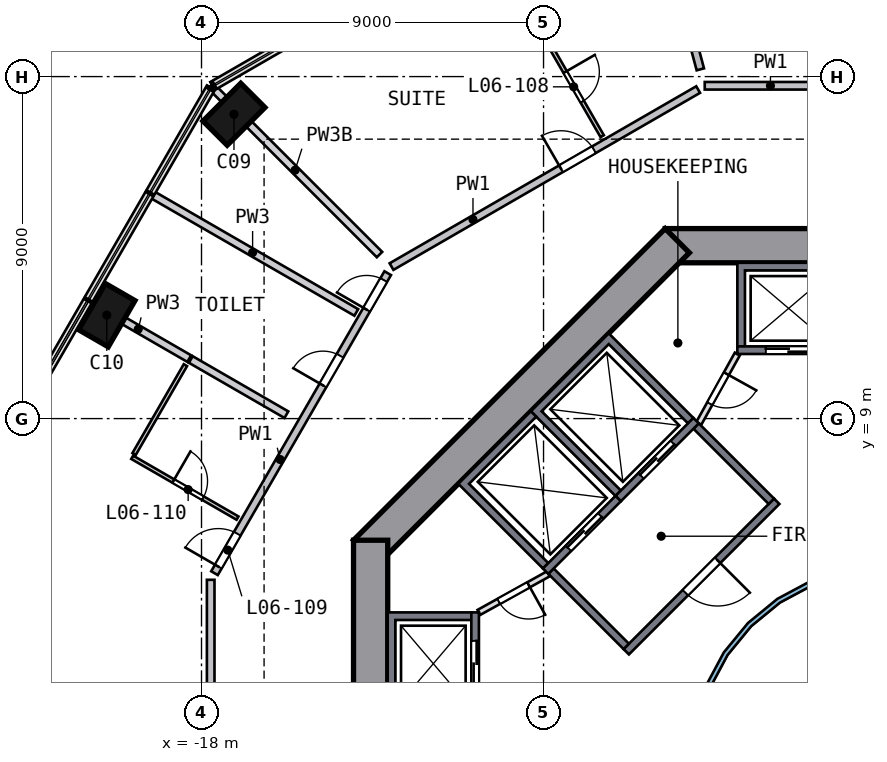
"""IFC4 building model, lengths in metres.
Left out: names, types, materials, properties, quantities, classifications, styles, units other than length and angle.
Written with IfcOpenShell. Run it as: python <this file> out.ifc"""

import sys

from ifc_helpers import new_model, si_unit, direction, frame, frame_2d, origin, origin_2d, place, context, subcontext, project, spatial, polyline, rectangle, outline, extrude, element, fill, save


model = new_model("IFC4")
c1 = context("Model", 3, precision=1e-05, world=origin(), true_north=direction((0.0, 1.0)))
c2 = subcontext(c1, "Body", "Model", "MODEL_VIEW")
j1 = project(units=[si_unit("LENGTHUNIT", "METRE"), si_unit("PLANEANGLEUNIT", "RADIAN")], contexts=[c1])
p1 = place(None, origin())
s1 = spatial("IfcSite", under=j1, at=p1, CompositionType="ELEMENT")
p2 = place(p1, origin())
s2 = spatial("IfcBuilding", under=s1, at=p2, CompositionType="ELEMENT")
p3 = place(p2, frame((0.0, 0.0, 34.0)))
s3 = spatial("IfcBuildingStorey", under=s2, at=p3, CompositionType="ELEMENT", Elevation=34.0)
p4 = place(p3, frame((-17.077, 17.077, 0.0), z_axis=(-0.056608184, -0.057490254, 0.996739878), x_axis=(0.705296544, 0.704306489, 0.08067934)))
e1 = element("IfcColumn", 1, at=p4, inside=s3, PredefinedType="COLUMN", context=c2, shape_type="SweptSolid", body=[
    extrude(rectangle(XDim=1.4, YDim=0.9, at=origin_2d()), origin(), (0.0, 0.0, 1.0), 4.705),
])
p5 = place(p3, frame((-20.445, 11.804, 0.0), z_axis=(-0.038868575, -0.068655708, 0.996882956), x_axis=(-0.498424045, -0.863336283, -0.078891906)))
e2 = element("IfcColumn", 2, at=p5, inside=s3, PredefinedType="COLUMN", context=c2, shape_type="SweptSolid", body=[
    extrude(rectangle(XDim=1.4, YDim=0.9, at=origin_2d()), origin(), (0.0, 0.0, 1.0), 4.705),
])
p6 = place(p3, frame((5.799, 13.55, 0.0), z_axis=(0.0, 0.0, 1.0), x_axis=(-1.0, 0.0, 0.0)))
e3 = element("IfcWall", 3, at=p6, inside=s3, PredefinedType="SHEAR", context=c2, shape_type="SweptSolid", body=[
    extrude(rectangle(XDim=11.598, YDim=0.9, at=frame_2d((5.799, 0.0))), origin(), (0.0, 0.0, 1.0), 5.0),
])
p7 = place(p6, frame((4.899, 0.0, 0.0)))
e4 = element("IfcOpeningElement", 4, at=p7, cuts=e3, PredefinedType="OPENING", context=c2, shape_type="SweptSolid", body=[
    extrude(rectangle(XDim=1.8, YDim=2.1, at=frame_2d((0.9, 1.05))), frame((0.0, 0.46, 0.0), z_axis=(0.0, -1.0, 0.0), x_axis=(1.0, 0.0, 0.0)), (0.0, 0.0, 1.0), 0.92),
])
p8 = place(p3, frame((-5.481, 13.682, 0.0), z_axis=(0.0, 0.0, 1.0), x_axis=(-0.707106781, -0.707106781, 0.0)))
e5 = element("IfcWall", 5, at=p8, inside=s3, PredefinedType="SHEAR", context=c2, shape_type="SweptSolid", body=[
    extrude(rectangle(XDim=11.598, YDim=0.9, at=frame_2d((5.799, 0.0))), origin(), (0.0, 0.0, 1.0), 5.0),
])
p9 = place(p3, frame((-13.55, 5.799, 0.0), z_axis=(0.0, 0.0, 1.0), x_axis=(0.0, -1.0, 0.0)))
e6 = element("IfcWall", 6, at=p9, inside=s3, PredefinedType="SHEAR", context=c2, shape_type="SweptSolid", body=[
    extrude(rectangle(XDim=11.598, YDim=0.9, at=frame_2d((5.799, 0.0))), origin(), (0.0, 0.0, 1.0), 5.0),
])
p10 = place(p9, frame((4.899, 0.0, 0.0)))
e7 = element("IfcOpeningElement", 7, at=p10, cuts=e6, PredefinedType="OPENING", context=c2, shape_type="SweptSolid", body=[
    extrude(rectangle(XDim=1.8, YDim=2.1, at=frame_2d((0.9, 1.05))), frame((0.0, 0.46, 0.0), z_axis=(0.0, -1.0, 0.0), x_axis=(1.0, 0.0, 0.0)), (0.0, 0.0, 1.0), 0.92),
])
p11 = place(p3, origin())
e8 = element("IfcWall", 8, at=p11, inside=s3, PredefinedType="SOLIDWALL", context=c2, shape_type="SweptSolid", body=[
    extrude(outline(polyline([(-3.9, 10.9), (-3.9, 13.1), (-1.2, 13.1), (-1.2, 10.9), (-1.4, 10.9), (-1.4, 12.9), (-3.7, 12.9), (-3.7, 10.9), (-3.9, 10.9)])), origin(), (0.0, 0.0, 1.0), 4.69),
])
p12 = place(p3, frame((-1.2, 10.8, 0.0), z_axis=(0.0, 0.0, 1.0), x_axis=(-1.0, 0.0, 0.0)))
e9 = element("IfcWall", 9, at=p12, inside=s3, PredefinedType="SOLIDWALL", context=c2, shape_type="SweptSolid", body=[
    extrude(rectangle(XDim=2.7, YDim=0.2, at=frame_2d((1.35, 0.0))), origin(), (0.0, 0.0, 1.0), 4.69),
])
p13 = place(p12, frame((0.75, 0.0, 0.0)))
e10 = element("IfcOpeningElement", 10, at=p13, cuts=e9, PredefinedType="OPENING", context=c2, shape_type="SweptSolid", body=[
    extrude(rectangle(XDim=1.2, YDim=2.1, at=frame_2d((0.6, 1.05))), frame((0.0, 0.11, 0.0), z_axis=(0.0, -1.0, 0.0), x_axis=(1.0, 0.0, 0.0)), (0.0, 0.0, 1.0), 0.22),
])
p14 = place(p3, origin())
e11 = element("IfcWall", 11, at=p14, inside=s3, PredefinedType="SOLIDWALL", context=c2, shape_type="SweptSolid", body=[
    extrude(outline(polyline([(-13.1, 3.9), (-10.9, 3.9), (-10.9, 3.7), (-12.9, 3.7), (-12.9, 1.4), (-10.9, 1.4), (-10.9, 1.2), (-13.1, 1.2), (-13.1, 3.9)])), origin(), (0.0, 0.0, 1.0), 4.69),
])
p15 = place(p3, frame((-10.8, 1.2, 0.0), z_axis=(0.0, 0.0, 1.0), x_axis=(0.0, 1.0, 0.0)))
e12 = element("IfcWall", 12, at=p15, inside=s3, PredefinedType="SOLIDWALL", context=c2, shape_type="SweptSolid", body=[
    extrude(rectangle(XDim=2.7, YDim=0.2, at=frame_2d((1.35, 0.0))), origin(), (0.0, 0.0, 1.0), 4.69),
])
p16 = place(p15, frame((0.75, 0.0, 0.0)))
e13 = element("IfcOpeningElement", 13, at=p16, cuts=e12, PredefinedType="OPENING", context=c2, shape_type="SweptSolid", body=[
    extrude(rectangle(XDim=1.2, YDim=2.1, at=frame_2d((0.6, 1.05))), frame((0.0, 0.11, 0.0), z_axis=(0.0, -1.0, 0.0), x_axis=(1.0, 0.0, 0.0)), (0.0, 0.0, 1.0), 0.22),
])
p17 = place(p3, origin())
e14 = element("IfcWall", 14, at=p17, inside=s3, PredefinedType="SOLIDWALL", context=c2, shape_type="SweptSolid", body=[
    extrude(outline(polyline([(-9.334, 9.192), (-7.283, 11.243), (-5.056, 9.016), (-5.197, 8.874), (-7.283, 10.96), (-9.051, 9.192), (-6.965, 7.106), (-7.106, 6.965), (-9.334, 9.192)])), origin(), (0.0, 0.0, 1.0), 4.69),
])
p18 = place(p3, frame((-4.985, 8.945, 0.0), z_axis=(0.0, 0.0, 1.0), x_axis=(-0.707106781, -0.707106781, 0.0)))
e15 = element("IfcWall", 15, at=p18, inside=s3, PredefinedType="SOLIDWALL", context=c2, shape_type="SweptSolid", body=[
    extrude(rectangle(XDim=2.9, YDim=0.2, at=frame_2d((1.45, 0.0))), origin(), (0.0, 0.0, 1.0), 4.69),
])
p19 = place(p18, frame((0.85, 0.0, 0.0)))
e16 = element("IfcOpeningElement", 16, at=p19, cuts=e15, PredefinedType="OPENING", context=c2, shape_type="SweptSolid", body=[
    extrude(rectangle(XDim=1.2, YDim=2.1, at=frame_2d((0.6, 1.05))), frame((0.0, 0.11, 0.0), z_axis=(0.0, -1.0, 0.0), x_axis=(1.0, 0.0, 0.0)), (0.0, 0.0, 1.0), 0.22),
])
p20 = place(p3, origin())
e17 = element("IfcWall", 17, at=p20, inside=s3, PredefinedType="SOLIDWALL", context=c2, shape_type="SweptSolid", body=[
    extrude(outline(polyline([(-11.243, 7.283), (-9.334, 9.192), (-9.192, 9.051), (-10.96, 7.283), (-8.874, 5.197), (-9.016, 5.056), (-11.243, 7.283)])), origin(), (0.0, 0.0, 1.0), 4.69),
])
p21 = place(p3, frame((-7.036, 6.894, 0.0), z_axis=(0.0, 0.0, 1.0), x_axis=(-0.707106781, -0.707106781, 0.0)))
e18 = element("IfcWall", 18, at=p21, inside=s3, PredefinedType="SOLIDWALL", context=c2, shape_type="SweptSolid", body=[
    extrude(rectangle(XDim=2.7, YDim=0.2, at=frame_2d((1.35, 0.0))), origin(), (0.0, 0.0, 1.0), 4.69),
])
p22 = place(p21, frame((0.65, 0.0, 0.0)))
e19 = element("IfcOpeningElement", 19, at=p22, cuts=e18, PredefinedType="OPENING", context=c2, shape_type="SweptSolid", body=[
    extrude(rectangle(XDim=1.2, YDim=2.1, at=frame_2d((0.6, 1.05))), frame((0.0, 0.11, 0.0), z_axis=(0.0, -1.0, 0.0), x_axis=(1.0, 0.0, 0.0)), (0.0, 0.0, 1.0), 0.22),
])
p23 = place(p3, frame((-2.864, 6.823, 0.0), z_axis=(0.0, 0.0, 1.0), x_axis=(-0.707106781, -0.707106781, 0.0)))
e20 = element("IfcWall", 20, at=p23, inside=s3, PredefinedType="SOLIDWALL", context=c2, shape_type="SweptSolid", body=[
    extrude(rectangle(XDim=5.6, YDim=0.2, at=frame_2d((2.8, 0.0))), origin(), (0.0, 0.0, 1.0), 4.69),
])
p24 = place(p23, frame((2.2, 0.0, 0.0)))
e21 = element("IfcOpeningElement", 21, at=p24, cuts=e20, PredefinedType="OPENING", context=c2, shape_type="SweptSolid", body=[
    extrude(rectangle(XDim=1.2, YDim=2.1, at=frame_2d((0.6, 1.05))), frame((0.0, 0.11, 0.0), z_axis=(0.0, -1.0, 0.0), x_axis=(1.0, 0.0, 0.0)), (0.0, 0.0, 1.0), 0.22),
])
for number, where, z_axis, x_axis in (
    (22, (-3.005, 6.823, 0.0), (0.0, 0.0, 1.0), (-0.707, 0.707, 0.0)),
    (23, (-6.823, 3.005, 0.0), (0.0, 0.0, 1.0), (-0.707, 0.707, 0.0)),
):
    element("IfcWall", number, at=place(p3, frame(where, z_axis=z_axis, x_axis=x_axis)), inside=s3, PredefinedType="SOLIDWALL", context=c2, shape_type="SweptSolid", body=[
        extrude(rectangle(XDim=2.8, YDim=0.2, at=frame_2d((1.4, 0.0))), origin(), (0.0, 0.0, 1.0), 4.69),
    ])
p25 = place(p3, frame((-3.9, 10.7, 0.0), z_axis=(0.0, 0.0, 1.0), x_axis=(-0.485692555, -0.874129705, 0.0)))
e24 = element("IfcWall", 24, at=p25, inside=s3, PredefinedType="PARTITIONING", context=c2, shape_type="SweptSolid", body=[
    extrude(rectangle(XDim=2.089, YDim=0.15, at=frame_2d((1.044, 0.0))), origin(), (0.0, 0.0, 1.0), 4.69),
])
p26 = place(p25, frame((0.594, 0.0, 0.0)))
e25 = element("IfcOpeningElement", 25, at=p26, cuts=e24, PredefinedType="OPENING", context=c2, shape_type="SweptSolid", body=[
    extrude(rectangle(XDim=0.9, YDim=2.1, at=frame_2d((0.45, 1.05))), frame((0.0, 0.085, 0.0), z_axis=(0.0, -1.0, 0.0), x_axis=(1.0, 0.0, 0.0)), (0.0, 0.0, 1.0), 0.17),
])
p27 = place(p3, frame((-8.874, 4.914, 0.0), z_axis=(0.0, 0.0, 1.0), x_axis=(-0.874129705, -0.485692555, 0.0)))
e26 = element("IfcWall", 26, at=p27, inside=s3, PredefinedType="PARTITIONING", context=c2, shape_type="SweptSolid", body=[
    extrude(rectangle(XDim=2.089, YDim=0.15, at=frame_2d((1.044, 0.0))), origin(), (0.0, 0.0, 1.0), 4.69),
])
p28 = place(p27, frame((0.594, 0.0, 0.0)))
e27 = element("IfcOpeningElement", 27, at=p28, cuts=e26, PredefinedType="OPENING", context=c2, shape_type="SweptSolid", body=[
    extrude(rectangle(XDim=0.9, YDim=2.1, at=frame_2d((0.45, 1.05))), frame((0.0, 0.085, 0.0), z_axis=(0.0, -1.0, 0.0), x_axis=(1.0, 0.0, 0.0)), (0.0, 0.0, 1.0), 0.17),
])
p29 = place(p3, origin())
e28 = element("IfcWall", 28, at=p29, inside=s3, PredefinedType="SOLIDWALL", context=c2, shape_type="SweptSolid", body=[
    extrude(outline(polyline([(5.021, -0.999), (4.73, -1.959), (4.257, -2.844), (3.62, -3.62), (2.844, -4.257), (1.959, -4.73), (0.999, -5.021), (0.0, -5.12), (-0.999, -5.021), (-1.959, -4.73), (-2.844, -4.257), (-3.62, -3.62), (-4.257, -2.844), (-4.73, -1.959), (-5.021, -0.999), (-5.12, 0.0), (-5.021, 0.999), (-4.73, 1.959), (-4.257, 2.844), (-3.62, 3.62), (-2.844, 4.257), (-1.959, 4.73), (-0.999, 5.021), (0.0, 5.12), (0.999, 5.021), (1.959, 4.73), (2.844, 4.257), (3.62, 3.62), (4.257, 2.844), (4.73, 1.959), (5.021, 0.999), (5.12, 0.0), (5.021, -0.999)]), holes=[polyline([(4.904, 0.976), (4.619, 1.913), (4.157, 2.778), (3.535, 3.535), (2.778, 4.157), (1.913, 4.619), (0.976, 4.904), (0.0, 5.0), (-0.976, 4.904), (-1.913, 4.619), (-2.778, 4.157), (-3.535, 3.535), (-4.157, 2.778), (-4.619, 1.913), (-4.904, 0.976), (-5.0, 0.0), (-4.904, -0.976), (-4.619, -1.913), (-4.157, -2.778), (-3.535, -3.535), (-2.778, -4.157), (-1.913, -4.619), (-0.976, -4.904), (0.0, -5.0), (0.976, -4.904), (1.913, -4.619), (2.778, -4.157), (3.535, -3.535), (4.157, -2.778), (4.619, -1.913), (4.904, -0.976), (5.0, 0.0), (4.904, 0.976)])]), origin(), (0.0, 0.0, 1.0), 4.69),
])
p30 = place(p3, frame((-17.758, 4.758, 0.0), z_axis=(0.0, 0.0, 1.0), x_axis=(0.0, -1.0, 0.0)))
e29 = element("IfcWall", 29, at=p30, inside=s3, PredefinedType="SOLIDWALL", context=c2, shape_type="SweptSolid", body=[
    extrude(rectangle(XDim=9.516, YDim=0.2, at=frame_2d((4.758, 0.0))), origin(), (0.0, 0.0, 1.0), 4.69),
])
p31 = place(p3, frame((-17.658, 4.932, 0.0), z_axis=(0.0, 0.0, 1.0), x_axis=(0.49999291, 0.866029497, 0.0)))
e30 = element("IfcWall", 30, at=p31, inside=s3, PredefinedType="SOLIDWALL", context=c2, shape_type="SweptSolid", body=[
    extrude(rectangle(XDim=9.116, YDim=0.2, at=frame_2d((4.558, 0.0))), origin(), (0.0, 0.0, 1.0), 4.69),
])
p32 = place(p31, frame((0.2, 0.0, 0.0)))
e31 = element("IfcOpeningElement", 31, at=p32, cuts=e30, PredefinedType="OPENING", context=c2, shape_type="SweptSolid", body=[
    extrude(rectangle(XDim=1.0, YDim=2.1, at=frame_2d((0.5, 1.05))), frame((0.0, 0.11, 0.0), z_axis=(0.0, -1.0, 0.0), x_axis=(1.0, 0.0, 0.0)), (0.0, 0.0, 1.0), 0.22),
])
p33 = place(p31, frame((8.008, 0.0, 0.0)))
e32 = element("IfcOpeningElement", 32, at=p33, cuts=e30, PredefinedType="OPENING", context=c2, shape_type="SweptSolid", body=[
    extrude(rectangle(XDim=0.9, YDim=2.1, at=frame_2d((0.45, 1.05))), frame((0.0, 0.11, 0.0), z_axis=(0.0, -1.0, 0.0), x_axis=(1.0, 0.0, 0.0)), (0.0, 0.0, 1.0), 0.22),
])
p34 = place(p31, frame((5.708, 0.0, 0.0)))
e33 = element("IfcOpeningElement", 33, at=p34, cuts=e30, PredefinedType="OPENING", context=c2, shape_type="SweptSolid", body=[
    extrude(rectangle(XDim=0.9, YDim=2.1, at=frame_2d((0.45, 1.05))), frame((0.0, 0.11, 0.0), z_axis=(0.0, -1.0, 0.0), x_axis=(1.0, 0.0, 0.0)), (0.0, 0.0, 1.0), 0.22),
])
p35 = place(p3, frame((-13.0, 13.0, 0.0), z_axis=(0.0, 0.0, 1.0), x_axis=(0.866028487, 0.49999466, 0.0)))
e34 = element("IfcWall", 34, at=p35, inside=s3, PredefinedType="SOLIDWALL", context=c2, shape_type="SweptSolid", body=[
    extrude(rectangle(XDim=9.316, YDim=0.2, at=frame_2d((4.658, 0.0))), origin(), (0.0, 0.0, 1.0), 4.69),
])
p36 = place(p35, frame((5.15, 0.0, 0.0)))
e35 = element("IfcOpeningElement", 35, at=p36, cuts=e34, PredefinedType="OPENING", context=c2, shape_type="SweptSolid", body=[
    extrude(rectangle(XDim=1.0, YDim=2.1, at=frame_2d((0.5, 1.05))), frame((0.0, 0.11, 0.0), z_axis=(0.0, -1.0, 0.0), x_axis=(1.0, 0.0, 0.0)), (0.0, 0.0, 1.0), 0.22),
])
p37 = place(p3, frame((-1.3, 17.758, 0.0), z_axis=(0.0, 0.0, 1.0), x_axis=(-1.0, 0.0, 0.0)))
e36 = element("IfcWall", 36, at=p37, inside=s3, PredefinedType="SOLIDWALL", context=c2, shape_type="SweptSolid", body=[
    extrude(rectangle(XDim=3.458, YDim=0.2, at=frame_2d((1.729, 0.0))), origin(), (0.0, 0.0, 1.0), 4.69),
])
p38 = place(p3, frame((-4.874, 18.19, 0.0), z_axis=(0.0, 0.0, 1.0), x_axis=(-0.258853085, 0.965916705, 0.0)))
e37 = element("IfcWall", 37, at=p38, inside=s3, PredefinedType="SOLIDWALL", context=c2, shape_type="SweptSolid", body=[
    extrude(rectangle(XDim=3.025, YDim=0.2, at=frame_2d((1.512, 0.0))), origin(), (0.0, 0.0, 1.0), 4.69),
])
p39 = place(p3, frame((-19.774, 8.068, 0.0), z_axis=(0.0, 0.0, 1.0), x_axis=(0.500009434, 0.866019957, 0.0)))
e38 = element("IfcWall", 38, at=p39, inside=s3, PredefinedType="PARTITIONING", context=c2, shape_type="SweptSolid", body=[
    extrude(rectangle(XDim=2.7, YDim=0.1, at=frame_2d((1.35, 0.0))), origin(), (0.0, 0.0, 1.0), 4.69),
])
p40 = place(p3, frame((-19.824, 7.981, 0.0), z_axis=(0.0, 0.0, 1.0), x_axis=(0.866008981, -0.500028444, 0.0)))
e39 = element("IfcWall", 39, at=p40, inside=s3, PredefinedType="PARTITIONING", context=c2, shape_type="SweptSolid", body=[
    extrude(rectangle(XDim=3.2, YDim=0.1, at=frame_2d((1.6, 0.0))), origin(), (0.0, 0.0, 1.0), 4.69),
])
p41 = place(p40, frame((1.25, 0.0, 0.0)))
e40 = element("IfcOpeningElement", 40, at=p41, cuts=e39, PredefinedType="OPENING", context=c2, shape_type="SweptSolid", body=[
    extrude(rectangle(XDim=0.9, YDim=2.1, at=frame_2d((0.45, 1.05))), frame((0.0, 0.06, 0.0), z_axis=(0.0, -1.0, 0.0), x_axis=(1.0, 0.0, 0.0)), (0.0, 0.0, 1.0), 0.12),
])
p42 = place(p3, frame((-9.006, 19.116, 0.0), z_axis=(0.0, 0.0, 1.0), x_axis=(0.499992859, -0.866029527, 0.0)))
e41 = element("IfcWall", 41, at=p42, inside=s3, PredefinedType="PARTITIONING", context=c2, shape_type="SweptSolid", body=[
    extrude(rectangle(XDim=3.1, YDim=0.1, at=frame_2d((1.55, 0.0))), origin(), (0.0, 0.0, 1.0), 4.69),
])
p43 = place(p42, frame((1.15, 0.0, 0.0)))
e42 = element("IfcOpeningElement", 42, at=p43, cuts=e41, PredefinedType="OPENING", context=c2, shape_type="SweptSolid", body=[
    extrude(rectangle(XDim=0.9, YDim=2.1, at=frame_2d((0.45, 1.05))), frame((0.0, 0.06, 0.0), z_axis=(0.0, -1.0, 0.0), x_axis=(1.0, 0.0, 0.0)), (0.0, 0.0, 1.0), 0.12),
])
p44 = place(p3, frame((-18.322, 10.578, 0.0), z_axis=(0.0, 0.0, 1.0), x_axis=(-0.86601126, 0.500024497, 0.0)))
e43 = element("IfcWall", 43, at=p44, inside=s3, PredefinedType="SOLIDWALL", context=c2, shape_type="SweptSolid", body=[
    extrude(rectangle(XDim=3.102, YDim=0.2, at=frame_2d((1.551, 0.0))), origin(), (0.0, 0.0, 1.0), 4.69),
])
p45 = place(p3, frame((-15.767, 9.103, 0.0), z_axis=(0.0, 0.0, 1.0), x_axis=(-0.866005015, 0.500035313, 0.0)))
e44 = element("IfcWall", 44, at=p45, inside=s3, PredefinedType="SOLIDWALL", context=c2, shape_type="SweptSolid", body=[
    extrude(rectangle(XDim=2.905, YDim=0.2, at=frame_2d((1.452, 0.0))), origin(), (0.0, 0.0, 1.0), 4.69),
])
p46 = place(p3, frame((-13.927, 11.794, 0.0), z_axis=(0.0, 0.0, 1.0), x_axis=(-0.866026184, 0.499998649, 0.0)))
e45 = element("IfcWall", 45, at=p46, inside=s3, PredefinedType="SOLIDWALL", context=c2, shape_type="SweptSolid", body=[
    extrude(rectangle(XDim=6.3, YDim=0.2, at=frame_2d((3.15, 0.0))), origin(), (0.0, 0.0, 1.0), 4.69),
])
p47 = place(p3, frame((-17.758, 17.758, 0.0), z_axis=(0.0, 0.0, 1.0), x_axis=(0.707106781, -0.707106781, 0.0)))
e46 = element("IfcWall", 46, at=p47, inside=s3, PredefinedType="SOLIDWALL", context=c2, shape_type="SweptSolid", body=[
    extrude(rectangle(XDim=6.282, YDim=0.2, at=frame_2d((3.141, 0.0))), origin(), (0.0, 0.0, 1.0), 4.19),
])
p48 = place(p13, origin())
e47 = element("IfcDoor", 47, at=p48, inside=s3, OperationType="DOUBLE_DOOR_SLIDING", PredefinedType="DOOR", context=c2, shape_type="SweptSolid", body=[
    extrude(rectangle(XDim=1.2, YDim=2.1, at=frame_2d((0.6, 1.05))), frame((0.0, 0.025, 0.0), z_axis=(0.0, -1.0, 0.0), x_axis=(1.0, 0.0, 0.0)), (0.0, 0.0, 1.0), 0.05),
])
fill(e10, e47)
p49 = place(p16, origin())
e48 = element("IfcDoor", 48, at=p49, inside=s3, OperationType="DOUBLE_DOOR_SLIDING", PredefinedType="DOOR", context=c2, shape_type="SweptSolid", body=[
    extrude(rectangle(XDim=1.2, YDim=2.1, at=frame_2d((0.6, 1.05))), frame((0.0, 0.025, 0.0), z_axis=(0.0, -1.0, 0.0), x_axis=(1.0, 0.0, 0.0)), (0.0, 0.0, 1.0), 0.05),
])
fill(e13, e48)
p50 = place(p19, origin())
e49 = element("IfcDoor", 49, at=p50, inside=s3, OperationType="DOUBLE_DOOR_SLIDING", PredefinedType="DOOR", context=c2, shape_type="SweptSolid", body=[
    extrude(rectangle(XDim=1.2, YDim=2.1, at=frame_2d((0.6, 1.05))), frame((0.0, 0.025, 0.0), z_axis=(0.0, -1.0, 0.0), x_axis=(1.0, 0.0, 0.0)), (0.0, 0.0, 1.0), 0.05),
])
fill(e16, e49)
p51 = place(p22, origin())
e50 = element("IfcDoor", 50, at=p51, inside=s3, OperationType="DOUBLE_DOOR_SLIDING", PredefinedType="DOOR", context=c2, shape_type="SweptSolid", body=[
    extrude(rectangle(XDim=1.2, YDim=2.1, at=frame_2d((0.6, 1.05))), frame((0.0, 0.025, 0.0), z_axis=(0.0, -1.0, 0.0), x_axis=(1.0, 0.0, 0.0)), (0.0, 0.0, 1.0), 0.05),
])
fill(e19, e50)
p52 = place(p24, origin())
e51 = element("IfcDoor", 51, at=p52, inside=s3, OperationType="SINGLE_SWING_LEFT", PredefinedType="DOOR", context=c2, shape_type="SweptSolid", body=[
    extrude(rectangle(XDim=1.2, YDim=2.1, at=frame_2d((0.6, 1.05))), frame((0.0, 0.025, 0.0), z_axis=(0.0, -1.0, 0.0), x_axis=(1.0, 0.0, 0.0)), (0.0, 0.0, 1.0), 0.05),
])
fill(e21, e51)
p53 = place(p26, origin())
e52 = element("IfcDoor", 52, at=p53, inside=s3, OperationType="SINGLE_SWING_LEFT", PredefinedType="DOOR", context=c2, shape_type="SweptSolid", body=[
    extrude(rectangle(XDim=0.9, YDim=2.1, at=frame_2d((0.45, 1.05))), frame((0.0, 0.025, 0.0), z_axis=(0.0, -1.0, 0.0), x_axis=(1.0, 0.0, 0.0)), (0.0, 0.0, 1.0), 0.05),
])
fill(e25, e52)
p54 = place(p28, origin())
e53 = element("IfcDoor", 53, at=p54, inside=s3, OperationType="SINGLE_SWING_LEFT", PredefinedType="DOOR", context=c2, shape_type="SweptSolid", body=[
    extrude(rectangle(XDim=0.9, YDim=2.1, at=frame_2d((0.45, 1.05))), frame((0.0, 0.025, 0.0), z_axis=(0.0, -1.0, 0.0), x_axis=(1.0, 0.0, 0.0)), (0.0, 0.0, 1.0), 0.05),
])
fill(e27, e53)
p55 = place(p36, origin())
e54 = element("IfcDoor", 54, at=p55, inside=s3, OperationType="SINGLE_SWING_LEFT", PredefinedType="DOOR", context=c2, shape_type="SweptSolid", body=[
    extrude(rectangle(XDim=1.0, YDim=2.1, at=frame_2d((0.5, 1.05))), frame((0.0, 0.025, 0.0), z_axis=(0.0, -1.0, 0.0), x_axis=(1.0, 0.0, 0.0)), (0.0, 0.0, 1.0), 0.05),
])
fill(e35, e54)
p56 = place(p43, origin())
e55 = element("IfcDoor", 55, at=p56, inside=s3, OperationType="SINGLE_SWING_LEFT", PredefinedType="DOOR", context=c2, shape_type="SweptSolid", body=[
    extrude(rectangle(XDim=0.9, YDim=2.1, at=frame_2d((0.45, 1.05))), frame((0.0, 0.025, 0.0), z_axis=(0.0, -1.0, 0.0), x_axis=(1.0, 0.0, 0.0)), (0.0, 0.0, 1.0), 0.05),
])
fill(e42, e55)
p57 = place(p32, origin())
e56 = element("IfcDoor", 56, at=p57, inside=s3, OperationType="SINGLE_SWING_LEFT", PredefinedType="DOOR", context=c2, shape_type="SweptSolid", body=[
    extrude(rectangle(XDim=1.0, YDim=2.1, at=frame_2d((0.5, 1.05))), frame((0.0, 0.025, 0.0), z_axis=(0.0, -1.0, 0.0), x_axis=(1.0, 0.0, 0.0)), (0.0, 0.0, 1.0), 0.05),
])
fill(e31, e56)
p58 = place(p41, origin())
e57 = element("IfcDoor", 57, at=p58, inside=s3, OperationType="SINGLE_SWING_LEFT", PredefinedType="DOOR", context=c2, shape_type="SweptSolid", body=[
    extrude(rectangle(XDim=0.9, YDim=2.1, at=frame_2d((0.45, 1.05))), frame((0.0, 0.025, 0.0), z_axis=(0.0, -1.0, 0.0), x_axis=(1.0, 0.0, 0.0)), (0.0, 0.0, 1.0), 0.05),
])
fill(e40, e57)
p59 = place(p33, origin())
e58 = element("IfcDoor", 58, at=p59, inside=s3, OperationType="SINGLE_SWING_LEFT", PredefinedType="DOOR", context=c2, shape_type="SweptSolid", body=[
    extrude(rectangle(XDim=0.9, YDim=2.1, at=frame_2d((0.45, 1.05))), frame((0.0, 0.025, 0.0), z_axis=(0.0, -1.0, 0.0), x_axis=(1.0, 0.0, 0.0)), (0.0, 0.0, 1.0), 0.05),
])
fill(e32, e58)
p60 = place(p34, origin())
e59 = element("IfcDoor", 59, at=p60, inside=s3, OperationType="SINGLE_SWING_LEFT", PredefinedType="DOOR", context=c2, shape_type="SweptSolid", body=[
    extrude(rectangle(XDim=0.9, YDim=2.1, at=frame_2d((0.45, 1.05))), frame((0.0, 0.025, 0.0), z_axis=(0.0, -1.0, 0.0), x_axis=(1.0, 0.0, 0.0)), (0.0, 0.0, 1.0), 0.05),
])
fill(e33, e59)
save(model, sys.argv[1])
